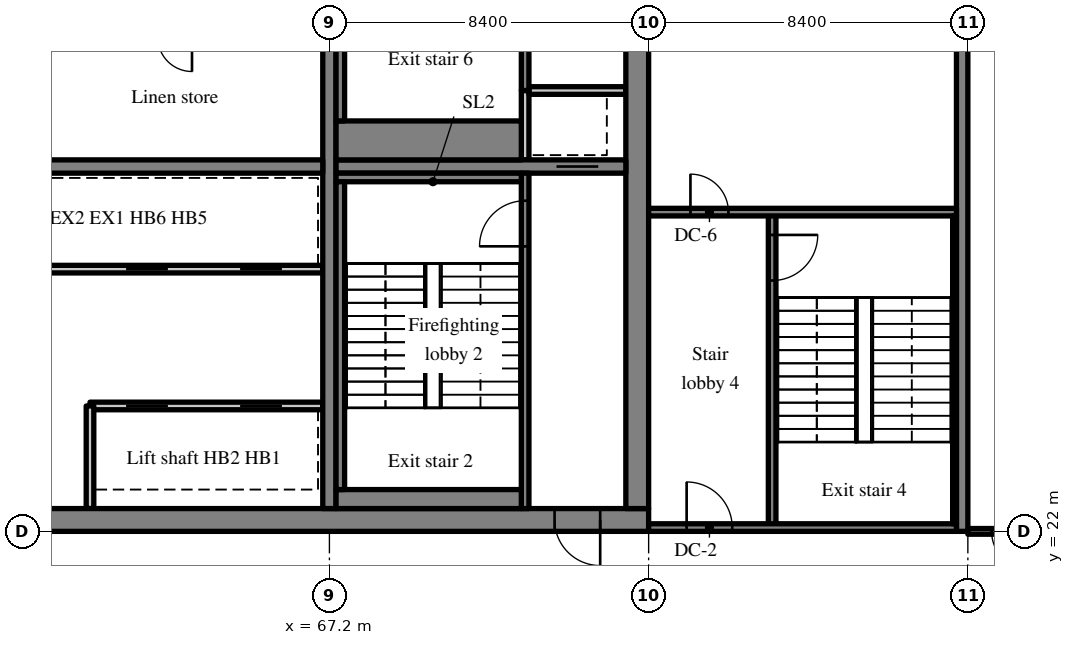
"""IFC4 building model, lengths in metres.
Left out: names, types, materials, properties, quantities, classifications, styles, units other than length and angle.
Written with IfcOpenShell. Run it as: python <this file> out.ifc"""

import sys

from ifc_helpers import new_model, si_unit, direction, frame, frame_2d, origin, place, context, subcontext, project, spatial, rectangle, extrude, source, transform, mapped, element, fill, save


model = new_model("IFC4")
c1 = context("Model", 3, precision=1e-05, world=origin(), true_north=direction((0.0, 1.0)))
c2 = subcontext(c1, "Body", "Model", "MODEL_VIEW")
j1 = project(units=[si_unit("LENGTHUNIT", "METRE"), si_unit("PLANEANGLEUNIT", "RADIAN")], contexts=[c1])
p1 = place(None, origin())
s1 = spatial("IfcSite", under=j1, at=p1, CompositionType="ELEMENT")
p2 = place(p1, origin())
s2 = spatial("IfcBuilding", under=s1, at=p2, CompositionType="ELEMENT")
p3 = place(p2, frame((0.0, 0.0, 249.1)))
s3 = spatial("IfcBuildingStorey", under=s2, at=p3, CompositionType="ELEMENT", Elevation=249.1)
m1 = source(origin(), c2, "Body", "SweptSolid", [
    extrude(rectangle(XDim=50.4, YDim=0.6, at=frame_2d((25.2, 0.0))), origin(), (0.0, 0.0, 1.0), 3.62),
])
p4 = place(p3, frame((25.2, 22.3, 0.0), z_axis=(0.0, 0.0, 1.0), x_axis=(1.0, 0.0, 0.0)))
e1 = element("IfcWall", 1, at=p4, inside=s3, PredefinedType="SHEAR", context=c2, shape_type="MappedRepresentation", body=[
    mapped(m1, transform((0.0, 0.0, 0.0), scale=1.0)),
])
m2 = source(origin(), c2, "Body", "SweptSolid", [
    extrude(rectangle(XDim=1.8, YDim=2.1, at=frame_2d((0.9, 1.05))), frame((0.0, 0.31, 0.0), z_axis=(0.0, -1.0, 0.0), x_axis=(1.0, 0.0, 0.0)), (0.0, 0.0, 1.0), 0.62),
])
p5 = place(p4, frame((15.9, 0.0, 0.0)))
e2 = element("IfcOpeningElement", 2, at=p5, cuts=e1, PredefinedType="OPENING", context=c2, shape_type="MappedRepresentation", body=[
    mapped(m2, transform((0.0, 0.0, 0.0), scale=1.0)),
])
m3 = source(origin(), c2, "Body", "SweptSolid", [
    extrude(rectangle(XDim=0.9, YDim=2.1, at=frame_2d((0.45, 1.05))), frame((0.0, 0.31, 0.0), z_axis=(0.0, -1.0, 0.0), x_axis=(1.0, 0.0, 0.0)), (0.0, 0.0, 1.0), 0.62),
])
p6 = place(p4, frame((21.513, 0.0, 0.0)))
e3 = element("IfcOpeningElement", 3, at=p6, cuts=e1, PredefinedType="OPENING", context=c2, shape_type="MappedRepresentation", body=[
    mapped(m3, transform((0.0, 0.0, 0.0), scale=1.0)),
])
p7 = place(p4, frame((32.7, 0.0, 0.0)))
e4 = element("IfcOpeningElement", 4, at=p7, cuts=e1, PredefinedType="OPENING", context=c2, shape_type="MappedRepresentation", body=[
    mapped(m2, transform((0.0, 0.0, 0.0), scale=1.0)),
])
m4 = source(origin(), c2, "Body", "SweptSolid", [
    extrude(rectangle(XDim=1.2, YDim=2.1, at=frame_2d((0.6, 1.05))), frame((0.0, 0.31, 0.0), z_axis=(0.0, -1.0, 0.0), x_axis=(1.0, 0.0, 0.0)), (0.0, 0.0, 1.0), 0.62),
])
p8 = place(p4, frame((6.488, 0.0, 0.0)))
e5 = element("IfcOpeningElement", 5, at=p8, cuts=e1, PredefinedType="OPENING", context=c2, shape_type="MappedRepresentation", body=[
    mapped(m4, transform((0.0, 0.0, 0.0), scale=1.0)),
])
p9 = place(p4, frame((47.925, 0.0, 0.0)))
e6 = element("IfcOpeningElement", 6, at=p9, cuts=e1, PredefinedType="OPENING", context=c2, shape_type="MappedRepresentation", body=[
    mapped(m4, transform((0.0, 0.0, 0.0), scale=1.0)),
])
m5 = source(origin(), c2, "Body", "SweptSolid", [
    extrude(rectangle(XDim=18.8, YDim=0.6, at=frame_2d((9.4, 0.0))), origin(), (0.0, 0.0, 1.0), 3.62),
])
p10 = place(p3, frame((75.3, 22.6, 0.0), z_axis=(0.0, 0.0, 1.0), x_axis=(0.0, 1.0, 0.0)))
e7 = element("IfcWall", 7, at=p10, inside=s3, PredefinedType="SHEAR", context=c2, shape_type="MappedRepresentation", body=[
    mapped(m5, transform((0.0, 0.0, 0.0), scale=1.0)),
])
p11 = place(p10, frame((12.8, 0.0, 0.0)))
e8 = element("IfcOpeningElement", 8, at=p11, cuts=e7, PredefinedType="OPENING", context=c2, shape_type="MappedRepresentation", body=[
    mapped(m4, transform((0.0, 0.0, 0.0), scale=1.0)),
])
m6 = source(origin(), c2, "Body", "SweptSolid", [
    extrude(rectangle(XDim=18.8, YDim=0.35, at=frame_2d((9.4, 0.0))), origin(), (0.0, 0.0, 1.0), 3.62),
])
p12 = place(p3, frame((67.2, 22.6, 0.0), z_axis=(0.0, 0.0, 1.0), x_axis=(0.0, 1.0, 0.0)))
e9 = element("IfcWall", 9, at=p12, inside=s3, PredefinedType="SHEAR", context=c2, shape_type="MappedRepresentation", body=[
    mapped(m6, transform((0.0, 0.0, 0.0), scale=1.0)),
])
m7 = source(origin(), c2, "Body", "SweptSolid", [
    extrude(rectangle(XDim=16.45, YDim=0.35, at=frame_2d((8.225, 0.0))), origin(), (0.0, 0.0, 1.0), 3.62),
])
p13 = place(p3, frame((50.575, 31.6, 0.0), z_axis=(0.0, 0.0, 1.0), x_axis=(1.0, 0.0, 0.0)))
e10 = element("IfcWall", 10, at=p13, inside=s3, PredefinedType="SHEAR", context=c2, shape_type="MappedRepresentation", body=[
    mapped(m7, transform((0.0, 0.0, 0.0), scale=1.0)),
])
m8 = source(origin(), c2, "Body", "SweptSolid", [
    extrude(rectangle(XDim=1.0, YDim=2.1, at=frame_2d((0.5, 1.05))), frame((0.0, 0.185, 0.0), z_axis=(0.0, -1.0, 0.0), x_axis=(1.0, 0.0, 0.0)), (0.0, 0.0, 1.0), 0.37),
])
p14 = place(p13, frame((0.613, 0.0, 0.0)))
e11 = element("IfcOpeningElement", 11, at=p14, cuts=e10, PredefinedType="OPENING", context=c2, shape_type="MappedRepresentation", body=[
    mapped(m8, transform((0.0, 0.0, 0.0), scale=1.0)),
])
m9 = source(origin(), c2, "Body", "SweptSolid", [
    extrude(rectangle(XDim=7.625, YDim=0.35, at=frame_2d((3.812, 0.0))), origin(), (0.0, 0.0, 1.0), 3.62),
])
p15 = place(p3, frame((67.375, 31.6, 0.0), z_axis=(0.0, 0.0, 1.0), x_axis=(1.0, 0.0, 0.0)))
e12 = element("IfcWall", 12, at=p15, inside=s3, PredefinedType="SHEAR", context=c2, shape_type="MappedRepresentation", body=[
    mapped(m9, transform((0.0, 0.0, 0.0), scale=1.0)),
])
m10 = source(origin(), c2, "Body", "SweptSolid", [
    extrude(rectangle(XDim=1.1, YDim=2.1, at=frame_2d((0.55, 1.05))), frame((0.0, 0.185, 0.0), z_axis=(0.0, -1.0, 0.0), x_axis=(1.0, 0.0, 0.0)), (0.0, 0.0, 1.0), 0.37),
])
p16 = place(p15, frame((5.8, 0.0, 0.0)))
e13 = element("IfcOpeningElement", 13, at=p16, cuts=e12, PredefinedType="OPENING", context=c2, shape_type="MappedRepresentation", body=[
    mapped(m10, transform((0.0, 0.0, 0.0), scale=1.0)),
])
m11 = source(origin(), c2, "Body", "SweptSolid", [
    extrude(rectangle(XDim=18.4, YDim=0.3, at=frame_2d((9.2, 0.0))), origin(), (0.0, 0.0, 1.0), 3.62),
])
p17 = place(p3, frame((83.85, 22.0, 0.0), z_axis=(0.0, 0.0, 1.0), x_axis=(0.0, 1.0, 0.0)))
e14 = element("IfcWall", 14, at=p17, inside=s3, PredefinedType="SHEAR", context=c2, shape_type="MappedRepresentation", body=[
    mapped(m11, transform((0.0, 0.0, 0.0), scale=1.0)),
])
m12 = source(origin(), c2, "Body", "SweptSolid", [
    extrude(rectangle(XDim=6.125, YDim=0.2, at=frame_2d((3.062, 0.0))), origin(), (0.0, 0.0, 1.0), 3.62),
])
p18 = place(p3, frame((67.025, 25.3, 0.0), z_axis=(0.0, 0.0, 1.0), x_axis=(-1.0, 0.0, 0.0)))
e15 = element("IfcWall", 15, at=p18, inside=s3, PredefinedType="SOLIDWALL", context=c2, shape_type="MappedRepresentation", body=[
    mapped(m12, transform((0.0, 0.0, 0.0), scale=1.0)),
])
m13 = source(origin(), c2, "Body", "SweptSolid", [
    extrude(rectangle(XDim=1.1, YDim=2.1, at=frame_2d((0.55, 1.05))), frame((0.0, 0.11, 0.0), z_axis=(0.0, -1.0, 0.0), x_axis=(1.0, 0.0, 0.0)), (0.0, 0.0, 1.0), 0.22),
])
p19 = place(p18, frame((1.075, 0.0, 0.0)))
e16 = element("IfcOpeningElement", 16, at=p19, cuts=e15, PredefinedType="OPENING", context=c2, shape_type="MappedRepresentation", body=[
    mapped(m13, transform((0.0, 0.0, 0.0), scale=1.0)),
])
p20 = place(p18, frame((4.075, 0.0, 0.0)))
e17 = element("IfcOpeningElement", 17, at=p20, cuts=e15, PredefinedType="OPENING", context=c2, shape_type="MappedRepresentation", body=[
    mapped(m13, transform((0.0, 0.0, 0.0), scale=1.0)),
])
m14 = source(origin(), c2, "Body", "SweptSolid", [
    extrude(rectangle(XDim=12.125, YDim=0.2, at=frame_2d((6.062, 0.0))), origin(), (0.0, 0.0, 1.0), 3.62),
])
p21 = place(p3, frame((67.025, 28.9, 0.0), z_axis=(0.0, 0.0, 1.0), x_axis=(-1.0, 0.0, 0.0)))
e18 = element("IfcWall", 18, at=p21, inside=s3, PredefinedType="SOLIDWALL", context=c2, shape_type="MappedRepresentation", body=[
    mapped(m14, transform((0.0, 0.0, 0.0), scale=1.0)),
])
p22 = place(p21, frame((1.075, 0.0, 0.0)))
e19 = element("IfcOpeningElement", 19, at=p22, cuts=e18, PredefinedType="OPENING", context=c2, shape_type="MappedRepresentation", body=[
    mapped(m13, transform((0.0, 0.0, 0.0), scale=1.0)),
])
p23 = place(p21, frame((4.075, 0.0, 0.0)))
e20 = element("IfcOpeningElement", 20, at=p23, cuts=e18, PredefinedType="OPENING", context=c2, shape_type="MappedRepresentation", body=[
    mapped(m13, transform((0.0, 0.0, 0.0), scale=1.0)),
])
m15 = source(origin(), c2, "Body", "SweptSolid", [
    extrude(rectangle(XDim=2.7, YDim=0.2, at=frame_2d((1.35, 0.0))), origin(), (0.0, 0.0, 1.0), 3.62),
])
p24 = place(p3, frame((60.9, 22.6, 0.0), z_axis=(0.0, 0.0, 1.0), x_axis=(0.0, 1.0, 0.0)))
e21 = element("IfcWall", 21, at=p24, inside=s3, PredefinedType="SOLIDWALL", context=c2, shape_type="MappedRepresentation", body=[
    mapped(m15, transform((0.0, 0.0, 0.0), scale=1.0)),
])
m16 = source(origin(), c2, "Body", "SweptSolid", [
    extrude(rectangle(XDim=8.825, YDim=0.2, at=frame_2d((4.413, 0.0))), origin(), (0.0, 0.0, 1.0), 3.62),
])
p25 = place(p3, frame((72.35, 22.6, 0.0), z_axis=(0.0, 0.0, 1.0), x_axis=(0.0, 1.0, 0.0)))
e22 = element("IfcWall", 22, at=p25, inside=s3, PredefinedType="SOLIDWALL", context=c2, shape_type="MappedRepresentation", body=[
    mapped(m16, transform((0.0, 0.0, 0.0), scale=1.0)),
])
m17 = source(origin(), c2, "Body", "SweptSolid", [
    extrude(rectangle(XDim=1.2, YDim=2.1, at=frame_2d((0.6, 1.05))), frame((0.0, 0.11, 0.0), z_axis=(0.0, -1.0, 0.0), x_axis=(1.0, 0.0, 0.0)), (0.0, 0.0, 1.0), 0.22),
])
p26 = place(p25, frame((6.9, 0.0, 0.0)))
e23 = element("IfcOpeningElement", 23, at=p26, cuts=e22, PredefinedType="OPENING", context=c2, shape_type="MappedRepresentation", body=[
    mapped(m17, transform((0.0, 0.0, 0.0), scale=1.0)),
])
m18 = source(origin(), c2, "Body", "SweptSolid", [
    extrude(rectangle(XDim=1.825, YDim=0.2, at=frame_2d((0.913, 0.0))), origin(), (0.0, 0.0, 1.0), 3.62),
])
p27 = place(p3, frame((72.35, 31.775, 0.0), z_axis=(0.0, 0.0, 1.0), x_axis=(0.0, 1.0, 0.0)))
e24 = element("IfcWall", 24, at=p27, inside=s3, PredefinedType="SOLIDWALL", context=c2, shape_type="MappedRepresentation", body=[
    mapped(m18, transform((0.0, 0.0, 0.0), scale=1.0)),
])
m19 = source(origin(), c2, "Body", "SweptSolid", [
    extrude(rectangle(XDim=2.55, YDim=0.2, at=frame_2d((1.275, 0.0))), origin(), (0.0, 0.0, 1.0), 3.62),
])
p28 = place(p3, frame((72.45, 33.6, 0.0), z_axis=(0.0, 0.0, 1.0), x_axis=(1.0, 0.0, 0.0)))
e25 = element("IfcWall", 25, at=p28, inside=s3, PredefinedType="SOLIDWALL", context=c2, shape_type="MappedRepresentation", body=[
    mapped(m19, transform((0.0, 0.0, 0.0), scale=1.0)),
])
m20 = source(origin(), c2, "Body", "SweptSolid", [
    extrude(rectangle(XDim=7.8, YDim=0.2, at=frame_2d((3.9, 0.0))), origin(), (0.0, 0.0, 1.0), 3.62),
])
p29 = place(p3, frame((72.35, 33.6, 0.0), z_axis=(0.0, 0.0, 1.0), x_axis=(0.0, 1.0, 0.0)))
e26 = element("IfcWall", 26, at=p29, inside=s3, PredefinedType="SOLIDWALL", context=c2, shape_type="MappedRepresentation", body=[
    mapped(m20, transform((0.0, 0.0, 0.0), scale=1.0)),
])
m21 = source(origin(), c2, "Body", "SweptSolid", [
    extrude(rectangle(XDim=1.8, YDim=2.1, at=frame_2d((0.9, 1.05))), frame((0.0, 0.11, 0.0), z_axis=(0.0, -1.0, 0.0), x_axis=(1.0, 0.0, 0.0)), (0.0, 0.0, 1.0), 0.22),
])
p30 = place(p29, frame((5.3, 0.0, 0.0)))
e27 = element("IfcOpeningElement", 27, at=p30, cuts=e26, PredefinedType="OPENING", context=c2, shape_type="MappedRepresentation", body=[
    mapped(m21, transform((0.0, 0.0, 0.0), scale=1.0)),
])
m22 = source(origin(), c2, "Body", "SweptSolid", [
    extrude(rectangle(XDim=8.3, YDim=0.2, at=frame_2d((4.15, 0.0))), origin(), (0.0, 0.0, 1.0), 3.62),
])
p31 = place(p3, frame((78.85, 22.1, 0.0), z_axis=(0.0, 0.0, 1.0), x_axis=(0.0, 1.0, 0.0)))
e28 = element("IfcWall", 28, at=p31, inside=s3, PredefinedType="SOLIDWALL", context=c2, shape_type="MappedRepresentation", body=[
    mapped(m22, transform((0.0, 0.0, 0.0), scale=1.0)),
])
p32 = place(p31, frame((6.5, 0.0, 0.0)))
e29 = element("IfcOpeningElement", 29, at=p32, cuts=e28, PredefinedType="OPENING", context=c2, shape_type="MappedRepresentation", body=[
    mapped(m17, transform((0.0, 0.0, 0.0), scale=1.0)),
])
m23 = source(origin(), c2, "Body", "SweptSolid", [
    extrude(rectangle(XDim=8.1, YDim=0.2, at=frame_2d((4.05, 0.0))), origin(), (0.0, 0.0, 1.0), 3.62),
])
p33 = place(p3, frame((83.7, 22.1, 0.0), z_axis=(0.0, 0.0, 1.0), x_axis=(-1.0, 0.0, 0.0)))
e30 = element("IfcWall", 30, at=p33, inside=s3, PredefinedType="SOLIDWALL", context=c2, shape_type="MappedRepresentation", body=[
    mapped(m23, transform((0.0, 0.0, 0.0), scale=1.0)),
])
p34 = place(p33, frame((5.9, 0.0, 0.0)))
e31 = element("IfcOpeningElement", 31, at=p34, cuts=e30, PredefinedType="OPENING", context=c2, shape_type="MappedRepresentation", body=[
    mapped(m17, transform((0.0, 0.0, 0.0), scale=1.0)),
])
p35 = place(p3, frame((83.7, 30.4, 0.0), z_axis=(0.0, 0.0, 1.0), x_axis=(-1.0, 0.0, 0.0)))
e32 = element("IfcWall", 32, at=p35, inside=s3, PredefinedType="SOLIDWALL", context=c2, shape_type="MappedRepresentation", body=[
    mapped(m23, transform((0.0, 0.0, 0.0), scale=1.0)),
])
m24 = source(origin(), c2, "Body", "SweptSolid", [
    extrude(rectangle(XDim=1.0, YDim=2.1, at=frame_2d((0.5, 1.05))), frame((0.0, 0.11, 0.0), z_axis=(0.0, -1.0, 0.0), x_axis=(1.0, 0.0, 0.0)), (0.0, 0.0, 1.0), 0.22),
])
p36 = place(p35, frame((6.0, 0.0, 0.0)))
e33 = element("IfcOpeningElement", 33, at=p36, cuts=e32, PredefinedType="OPENING", context=c2, shape_type="MappedRepresentation", body=[
    mapped(m24, transform((0.0, 0.0, 0.0), scale=1.0)),
])
m25 = source(origin(), c2, "Body", "SweptSolid", [
    extrude(rectangle(XDim=4.875, YDim=0.5, at=frame_2d((2.438, 0.0))), origin(), (0.0, 0.0, 1.0), 3.62),
])
p37 = place(p3, frame((67.375, 22.85, 0.0), z_axis=(0.0, 0.0, 1.0), x_axis=(1.0, 0.0, 0.0)))
e34 = element("IfcWall", 34, at=p37, inside=s3, PredefinedType="SOLIDWALL", context=c2, shape_type="MappedRepresentation", body=[
    mapped(m25, transform((0.0, 0.0, 0.0), scale=1.0)),
])
m26 = source(origin(), c2, "Body", "SweptSolid", [
    extrude(rectangle(XDim=4.875, YDim=0.225, at=frame_2d((2.438, 0.0))), origin(), (0.0, 0.0, 1.0), 3.62),
])
p38 = place(p3, frame((67.375, 31.312, 0.0), z_axis=(0.0, 0.0, 1.0), x_axis=(1.0, 0.0, 0.0)))
e35 = element("IfcWall", 35, at=p38, inside=s3, PredefinedType="SOLIDWALL", context=c2, shape_type="MappedRepresentation", body=[
    mapped(m26, transform((0.0, 0.0, 0.0), scale=1.0)),
])
m27 = source(origin(), c2, "Body", "SweptSolid", [
    extrude(rectangle(XDim=8.1, YDim=0.225, at=frame_2d((4.05, 0.0))), origin(), (0.0, 0.0, 1.0), 3.62),
])
p39 = place(p3, frame((67.487, 23.1, 0.0), z_axis=(0.0, 0.0, 1.0), x_axis=(0.0, 1.0, 0.0)))
e36 = element("IfcWall", 36, at=p39, inside=s3, PredefinedType="SOLIDWALL", context=c2, shape_type="MappedRepresentation", body=[
    mapped(m27, transform((0.0, 0.0, 0.0), scale=1.0)),
])
m28 = source(origin(), c2, "Body", "SweptSolid", [
    extrude(rectangle(XDim=4.875, YDim=1.025, at=frame_2d((2.438, 0.0))), origin(), (0.0, 0.0, 1.0), 3.62),
])
p40 = place(p3, frame((67.375, 32.287, 0.0), z_axis=(0.0, 0.0, 1.0), x_axis=(1.0, 0.0, 0.0)))
e37 = element("IfcWall", 37, at=p40, inside=s3, PredefinedType="SOLIDWALL", context=c2, shape_type="MappedRepresentation", body=[
    mapped(m28, transform((0.0, 0.0, 0.0), scale=1.0)),
])
p41 = place(p3, frame((67.487, 32.8, 0.0), z_axis=(0.0, 0.0, 1.0), x_axis=(0.0, 1.0, 0.0)))
e38 = element("IfcWall", 38, at=p41, inside=s3, PredefinedType="SOLIDWALL", context=c2, shape_type="MappedRepresentation", body=[
    mapped(m27, transform((0.0, 0.0, 0.0), scale=1.0)),
])
m29 = source(origin(), c2, "Body", "SweptSolid", [
    extrude(rectangle(XDim=8.1, YDim=0.1, at=frame_2d((4.05, 0.0))), origin(), (0.0, 0.0, 1.0), 3.62),
])
p42 = place(p3, frame((83.65, 22.2, 0.0), z_axis=(0.0, 0.0, 1.0), x_axis=(0.0, 1.0, 0.0)))
e39 = element("IfcWall", 39, at=p42, inside=s3, PredefinedType="SOLIDWALL", context=c2, shape_type="MappedRepresentation", body=[
    mapped(m29, transform((0.0, 0.0, 0.0), scale=1.0)),
])
m30 = source(origin(), c2, "Body", "SweptSolid", [
    extrude(rectangle(XDim=1.9, YDim=0.15, at=frame_2d((0.95, 0.0))), origin(), (0.0, 0.0, 1.0), 2.92),
])
p43 = place(p3, frame((84.0, 22.0, 0.0), z_axis=(0.0, 0.0, 1.0), x_axis=(1.0, 0.0, 0.0)))
e40 = element("IfcWall", 40, at=p43, inside=s3, PredefinedType="PARTITIONING", context=c2, shape_type="MappedRepresentation", body=[
    mapped(m30, transform((0.0, 0.0, 0.0), scale=1.0)),
])
m31 = source(origin(), c2, "Body", "SweptSolid", [
    extrude(rectangle(XDim=1.0, YDim=2.1, at=frame_2d((0.5, 1.05))), frame((0.0, 0.085, 0.0), z_axis=(0.0, -1.0, 0.0), x_axis=(1.0, 0.0, 0.0)), (0.0, 0.0, 1.0), 0.17),
])
p44 = place(p43, frame((0.625, 0.0, 0.0)))
e41 = element("IfcOpeningElement", 41, at=p44, cuts=e40, PredefinedType="OPENING", context=c2, shape_type="MappedRepresentation", body=[
    mapped(m31, transform((0.0, 0.0, 0.0), scale=1.0)),
])
m32 = source(origin(), c2, "Body", "SweptSolid", [
    extrude(rectangle(XDim=1.1, YDim=2.1, at=frame_2d((0.55, 1.05))), frame((0.0, 0.025, 0.0), z_axis=(0.0, -1.0, 0.0), x_axis=(1.0, 0.0, 0.0)), (0.0, 0.0, 1.0), 0.05),
])
p45 = place(p19, origin())
e42 = element("IfcDoor", 42, at=p45, inside=s3, OperationType="SLIDING_TO_RIGHT", PredefinedType="DOOR", context=c2, shape_type="MappedRepresentation", body=[
    mapped(m32, transform((0.0, 0.0, 0.0), scale=1.0)),
])
fill(e16, e42)
p46 = place(p20, origin())
e43 = element("IfcDoor", 43, at=p46, inside=s3, OperationType="SLIDING_TO_LEFT", PredefinedType="DOOR", context=c2, shape_type="MappedRepresentation", body=[
    mapped(m32, transform((0.0, 0.0, 0.0), scale=1.0)),
])
fill(e17, e43)
p47 = place(p22, origin())
e44 = element("IfcDoor", 44, at=p47, inside=s3, OperationType="SLIDING_TO_RIGHT", PredefinedType="DOOR", context=c2, shape_type="MappedRepresentation", body=[
    mapped(m32, transform((0.0, 0.0, 0.0), scale=1.0)),
])
fill(e19, e44)
p48 = place(p23, origin())
e45 = element("IfcDoor", 45, at=p48, inside=s3, OperationType="SLIDING_TO_LEFT", PredefinedType="DOOR", context=c2, shape_type="MappedRepresentation", body=[
    mapped(m32, transform((0.0, 0.0, 0.0), scale=1.0)),
])
fill(e20, e45)
m33 = source(origin(), c2, "Body", "SweptSolid", [
    extrude(rectangle(XDim=1.2, YDim=2.1, at=frame_2d((0.6, 1.05))), frame((0.0, 0.025, 0.0), z_axis=(0.0, -1.0, 0.0), x_axis=(1.0, 0.0, 0.0)), (0.0, 0.0, 1.0), 0.05),
])
p49 = place(p26, origin())
e46 = element("IfcDoor", 46, at=p49, inside=s3, OperationType="SINGLE_SWING_LEFT", PredefinedType="DOOR", context=c2, shape_type="MappedRepresentation", body=[
    mapped(m33, transform((0.0, 0.0, 0.0), scale=1.0)),
])
fill(e23, e46)
m34 = source(origin(), c2, "Body", "SweptSolid", [
    extrude(rectangle(XDim=1.2, YDim=2.1, at=frame_2d((0.6, 1.05))), frame((0.0, 0.225, 0.0), z_axis=(0.0, -1.0, 0.0), x_axis=(1.0, 0.0, 0.0)), (0.0, 0.0, 1.0), 0.05),
])
p50 = place(p9, origin())
e47 = element("IfcDoor", 47, at=p50, inside=s3, OperationType="SINGLE_SWING_RIGHT", PredefinedType="DOOR", context=c2, shape_type="MappedRepresentation", body=[
    mapped(m34, transform((0.0, 0.0, 0.0), scale=1.0)),
])
fill(e6, e47)
p51 = place(p16, origin())
e48 = element("IfcDoor", 48, at=p51, inside=s3, OperationType="SLIDING_TO_RIGHT", PredefinedType="DOOR", context=c2, shape_type="MappedRepresentation", body=[
    mapped(m32, transform((0.0, 0.0, 0.0), scale=1.0)),
])
fill(e13, e48)
p52 = place(p32, origin())
e49 = element("IfcDoor", 49, at=p52, inside=s3, OperationType="SINGLE_SWING_RIGHT", PredefinedType="DOOR", context=c2, shape_type="MappedRepresentation", body=[
    mapped(m33, transform((0.0, 0.0, 0.0), scale=1.0)),
])
fill(e29, e49)
p53 = place(p34, origin())
e50 = element("IfcDoor", 50, at=p53, inside=s3, OperationType="SINGLE_SWING_RIGHT", PredefinedType="DOOR", context=c2, shape_type="MappedRepresentation", body=[
    mapped(m33, transform((0.0, 0.0, 0.0), scale=1.0)),
])
fill(e31, e50)
m35 = source(origin(), c2, "Body", "SweptSolid", [
    extrude(rectangle(XDim=1.0, YDim=2.1, at=frame_2d((0.5, 1.05))), frame((0.0, 0.025, 0.0), z_axis=(0.0, -1.0, 0.0), x_axis=(1.0, 0.0, 0.0)), (0.0, 0.0, 1.0), 0.05),
])
p54 = place(p36, origin())
e51 = element("IfcDoor", 51, at=p54, inside=s3, OperationType="SINGLE_SWING_RIGHT", PredefinedType="DOOR", context=c2, shape_type="MappedRepresentation", body=[
    mapped(m35, transform((0.0, 0.0, 0.0), scale=1.0)),
])
fill(e33, e51)
p55 = place(p44, origin())
e52 = element("IfcDoor", 52, at=p55, inside=s3, OperationType="SINGLE_SWING_RIGHT", PredefinedType="DOOR", context=c2, shape_type="MappedRepresentation", body=[
    mapped(m35, transform((0.0, 0.0, 0.0), scale=1.0)),
])
fill(e41, e52)
save(model, sys.argv[1])
